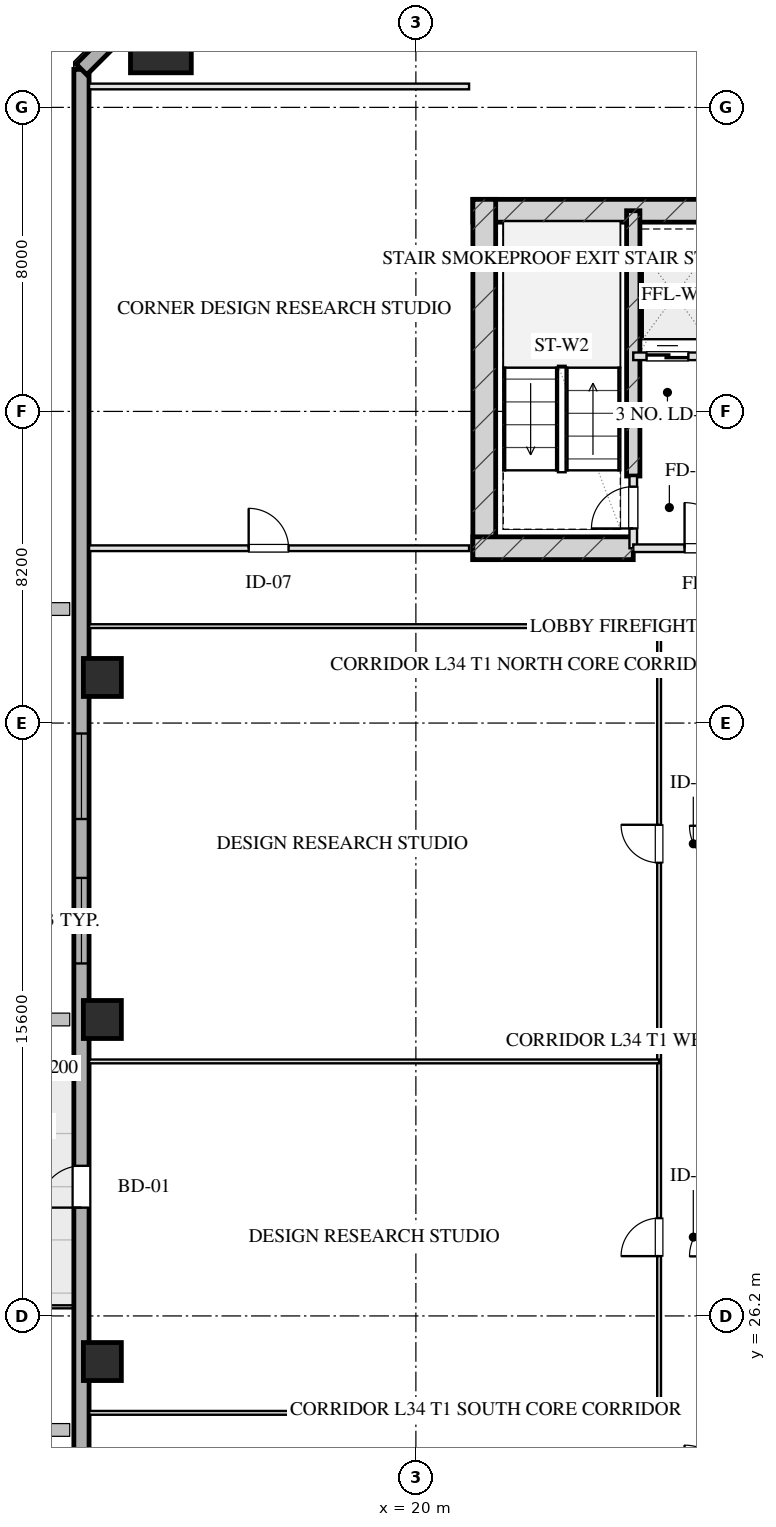
"""IFC4 building model, lengths in metres.
Left out: names, types, materials, properties, quantities, classifications, styles, units other than length and angle.
Written with IfcOpenShell. Run it as: python <this file> out.ifc"""

import sys

from ifc_helpers import new_model, si_unit, direction, frame, frame_2d, origin, origin_2d, place, context, subcontext, project, spatial, rectangle, hollow_rectangle, extrude, element, fill, save


model = new_model("IFC4")
c1 = context("Model", 3, precision=1e-05, world=origin(), true_north=direction((0.0, 1.0)))
c2 = subcontext(c1, "Body", "Model", "MODEL_VIEW")
j1 = project(units=[si_unit("LENGTHUNIT", "METRE"), si_unit("PLANEANGLEUNIT", "RADIAN")], contexts=[c1])
p1 = place(None, origin())
s1 = spatial("IfcSite", under=j1, at=p1, CompositionType="ELEMENT")
p2 = place(p1, origin())
s2 = spatial("IfcBuilding", under=s1, at=p2, CompositionType="ELEMENT")
p3 = place(p2, frame((0.0, 0.0, 131.1)))
s3 = spatial("IfcBuildingStorey", under=s2, at=p3, CompositionType="ELEMENT", Elevation=131.1)
p4 = place(p3, frame((21.5, 55.28, 0.0), z_axis=(0.0, 0.0, 1.0), x_axis=(1.0, 0.0, 0.0)))
e1 = element("IfcWall", 1, at=p4, inside=s3, PredefinedType="SHEAR", context=c2, shape_type="SweptSolid", body=[
    extrude(rectangle(XDim=17.0, YDim=0.6, at=frame_2d((8.5, 0.0))), origin(), (0.0, 0.0, 1.0), 3.45),
])
p5 = place(p3, frame((21.8, 46.1, 0.0), z_axis=(0.0, 0.0, 1.0), x_axis=(0.0, 1.0, 0.0)))
e2 = element("IfcWall", 2, at=p5, inside=s3, PredefinedType="SHEAR", context=c2, shape_type="SweptSolid", body=[
    extrude(rectangle(XDim=9.48, YDim=0.6, at=frame_2d((4.74, 0.0))), origin(), (0.0, 0.0, 1.0), 3.45),
])
p6 = place(p3, frame((25.72, 48.3, 0.0), z_axis=(0.0, 0.0, 1.0), x_axis=(0.0, 1.0, 0.0)))
e3 = element("IfcWall", 3, at=p6, inside=s3, PredefinedType="SHEAR", context=c2, shape_type="SweptSolid", body=[
    extrude(rectangle(XDim=6.98, YDim=0.35, at=frame_2d((3.49, 0.0))), origin(), (0.0, 0.0, 1.0), 3.45),
])
p7 = place(p3, frame((21.5, 46.4, 0.0), z_axis=(0.0, 0.0, 1.0), x_axis=(1.0, 0.0, 0.0)))
e4 = element("IfcWall", 4, at=p7, inside=s3, PredefinedType="SHEAR", context=c2, shape_type="SweptSolid", body=[
    extrude(rectangle(XDim=4.22, YDim=0.6, at=frame_2d((2.11, 0.0))), origin(), (0.0, 0.0, 1.0), 3.45),
])
p8 = place(p3, frame((13.29, 59.71, 0.0), z_axis=(0.0, 0.0, 1.0), x_axis=(1.0, 0.0, 0.0)))
e5 = element("IfcColumn", 5, at=p8, inside=s3, PredefinedType="COLUMN", context=c2, shape_type="SweptSolid", body=[
    extrude(hollow_rectangle(XDim=1.6, YDim=1.6, WallThickness=0.055, at=origin_2d()), origin(), (0.0, 0.0, 1.0), 3.451),
])
for number, where, z_axis, x_axis in (
    (6, (11.75, 25.0, 0.0), (0.0, 0.0, 1.0), (1.0, 0.0, 0.0)),
    (7, (11.75, 34.0, 0.0), (0.0, 0.0, 1.0), (1.0, 0.0, 0.0)),
    (8, (11.75, 43.0, 0.0), (0.0, 0.0, 1.0), (1.0, 0.0, 0.0)),
):
    element("IfcColumn", number, at=place(p3, frame(where, z_axis=z_axis, x_axis=x_axis)), inside=s3, PredefinedType="COLUMN", context=c2, shape_type="SweptSolid", body=[
        extrude(hollow_rectangle(XDim=1.0, YDim=1.0, WallThickness=0.036, at=origin_2d()), origin(), (0.0, 0.0, 1.0), 3.451),
    ])
p9 = place(p3, frame((11.2, 9.0, 0.0), z_axis=(0.0, 0.0, 1.0), x_axis=(0.0, 1.0, 0.0)))
e9 = element("IfcWall", 9, at=p9, inside=s3, PredefinedType="SOLIDWALL", context=c2, shape_type="SweptSolid", body=[
    extrude(rectangle(XDim=50.0, YDim=0.4, at=frame_2d((25.0, 0.0))), origin(), (0.0, 0.0, 1.0), 2.61),
])
p10 = place(p9, frame((26.475, 0.0, 0.75)))
e10 = element("IfcOpeningElement", 10, at=p10, cuts=e9, PredefinedType="OPENING", context=c2, shape_type="SweptSolid", body=[
    extrude(rectangle(XDim=2.25, YDim=1.46, at=frame_2d((1.125, 0.73))), frame((0.0, 0.21, 0.0), z_axis=(0.0, -1.0, 0.0), x_axis=(1.0, 0.0, 0.0)), (0.0, 0.0, 1.0), 0.42),
])
p11 = place(p9, frame((30.275, 0.0, 0.75)))
e11 = element("IfcOpeningElement", 11, at=p11, cuts=e9, PredefinedType="OPENING", context=c2, shape_type="SweptSolid", body=[
    extrude(rectangle(XDim=2.25, YDim=1.46, at=frame_2d((1.125, 0.73))), frame((0.0, 0.21, 0.0), z_axis=(0.0, -1.0, 0.0), x_axis=(1.0, 0.0, 0.0)), (0.0, 0.0, 1.0), 0.42),
])
p12 = place(p9, frame((20.05, 0.0, 0.0)))
e12 = element("IfcOpeningElement", 12, at=p12, cuts=e9, PredefinedType="OPENING", context=c2, shape_type="SweptSolid", body=[
    extrude(rectangle(XDim=1.1, YDim=2.15, at=frame_2d((0.55, 1.075))), frame((0.0, 0.21, 0.0), z_axis=(0.0, -1.0, 0.0), x_axis=(1.0, 0.0, 0.0)), (0.0, 0.0, 1.0), 0.42),
])
p13 = place(p3, frame((11.2, 59.0, 0.0), z_axis=(0.0, 0.0, 1.0), x_axis=(0.707106781187, 0.707106781187, 0.0)))
e13 = element("IfcWall", 13, at=p13, inside=s3, PredefinedType="SOLIDWALL", context=c2, shape_type="SweptSolid", body=[
    extrude(rectangle(XDim=3.96, YDim=0.4, at=frame_2d((1.98, 0.0))), origin(), (0.0, 0.0, 1.0), 2.61),
])
p14 = place(p3, frame((25.72, 46.4, 0.0), z_axis=(0.0, 0.0, 1.0), x_axis=(0.0, 1.0, 0.0)))
e14 = element("IfcWall", 14, at=p14, inside=s3, PredefinedType="PARTITIONING", context=c2, shape_type="SweptSolid", body=[
    extrude(rectangle(XDim=1.9, YDim=0.2, at=frame_2d((0.95, 0.0))), origin(), (0.0, 0.0, 1.0), 3.175),
])
p15 = place(p14, frame((0.52, 0.0, 0.0)))
e15 = element("IfcOpeningElement", 15, at=p15, cuts=e14, PredefinedType="OPENING", context=c2, shape_type="SweptSolid", body=[
    extrude(rectangle(XDim=1.1, YDim=2.05, at=frame_2d((0.55, 1.025))), frame((0.0, 0.11, 0.0), z_axis=(0.0, -1.0, 0.0), x_axis=(1.0, 0.0, 0.0)), (0.0, 0.0, 1.0), 0.22),
])
p16 = place(p3, frame((25.72, 46.4, 0.0), z_axis=(0.0, 0.0, 1.0), x_axis=(1.0, 0.0, 0.0)))
e16 = element("IfcWall", 16, at=p16, inside=s3, PredefinedType="PARTITIONING", context=c2, shape_type="SweptSolid", body=[
    extrude(rectangle(XDim=3.83, YDim=0.2, at=frame_2d((1.915, 0.0))), origin(), (0.0, 0.0, 1.0), 3.175),
])
p17 = place(p16, frame((1.35, 0.0, 0.0)))
e17 = element("IfcOpeningElement", 17, at=p17, cuts=e16, PredefinedType="OPENING", context=c2, shape_type="SweptSolid", body=[
    extrude(rectangle(XDim=1.2, YDim=2.05, at=frame_2d((0.6, 1.025))), frame((0.0, 0.11, 0.0), z_axis=(0.0, -1.0, 0.0), x_axis=(1.0, 0.0, 0.0)), (0.0, 0.0, 1.0), 0.22),
])
p18 = place(p3, frame((25.72, 51.45, 0.0), z_axis=(0.0, 0.0, 1.0), x_axis=(1.0, 0.0, 0.0)))
e18 = element("IfcWall", 18, at=p18, inside=s3, PredefinedType="PARTITIONING", context=c2, shape_type="SweptSolid", body=[
    extrude(rectangle(XDim=2.1, YDim=0.2, at=frame_2d((1.05, 0.0))), origin(), (0.0, 0.0, 1.0), 3.175),
])
p19 = place(p18, frame((0.35, 0.0, 0.0)))
e19 = element("IfcOpeningElement", 19, at=p19, cuts=e18, PredefinedType="OPENING", context=c2, shape_type="SweptSolid", body=[
    extrude(rectangle(XDim=1.1, YDim=2.05, at=frame_2d((0.55, 1.025))), frame((0.0, 0.11, 0.0), z_axis=(0.0, -1.0, 0.0), x_axis=(1.0, 0.0, 0.0)), (0.0, 0.0, 1.0), 0.22),
])
p20 = place(p3, frame((11.4, 58.55, 0.0), z_axis=(0.0, 0.0, 1.0), x_axis=(1.0, 0.0, 0.0)))
e20 = element("IfcWall", 20, at=p20, inside=s3, PredefinedType="PARTITIONING", context=c2, shape_type="SweptSolid", body=[
    extrude(rectangle(XDim=10.0, YDim=0.15, at=frame_2d((5.0, 0.0))), origin(), (0.0, 0.0, 1.0), 3.175),
])
p21 = place(p3, frame((11.4, 46.4, 0.0), z_axis=(0.0, 0.0, 1.0), x_axis=(1.0, 0.0, 0.0)))
e21 = element("IfcWall", 21, at=p21, inside=s3, PredefinedType="PARTITIONING", context=c2, shape_type="SweptSolid", body=[
    extrude(rectangle(XDim=10.0, YDim=0.15, at=frame_2d((5.0, 0.0))), origin(), (0.0, 0.0, 1.0), 3.175),
])
p22 = place(p21, frame((4.2, 0.0, 0.0)))
e22 = element("IfcOpeningElement", 22, at=p22, cuts=e21, PredefinedType="OPENING", context=c2, shape_type="SweptSolid", body=[
    extrude(rectangle(XDim=1.05, YDim=2.05, at=frame_2d((0.525, 1.025))), frame((0.0, 0.085, 0.0), z_axis=(0.0, -1.0, 0.0), x_axis=(1.0, 0.0, 0.0)), (0.0, 0.0, 1.0), 0.17),
])
for number, where, z_axis, x_axis in (
    (23, (11.4, 23.65, 0.0), (0.0, 0.0, 1.0), (1.0, 0.0, 0.0)),
    (24, (11.4, 44.35, 0.0), (0.0, 0.0, 1.0), (1.0, 0.0, 0.0)),
):
    element("IfcWall", number, at=place(p3, frame(where, z_axis=z_axis, x_axis=x_axis)), inside=s3, PredefinedType="MOVABLE", context=c2, shape_type="SweptSolid", body=[
        extrude(rectangle(XDim=15.0, YDim=0.1, at=frame_2d((7.5, 0.0))), origin(), (0.0, 0.0, 1.0), 3.175),
    ])
p23 = place(p3, frame((26.4, 23.65, 0.0), z_axis=(0.0, 0.0, 1.0), x_axis=(0.0, 1.0, 0.0)))
e25 = element("IfcWall", 25, at=p23, inside=s3, PredefinedType="MOVABLE", context=c2, shape_type="SweptSolid", body=[
    extrude(rectangle(XDim=20.7, YDim=0.1, at=frame_2d((10.35, 0.0))), origin(), (0.0, 0.0, 1.0), 3.175),
])
p24 = place(p23, frame((4.124, 0.0, 0.0)))
e26 = element("IfcOpeningElement", 26, at=p24, cuts=e25, PredefinedType="OPENING", context=c2, shape_type="SweptSolid", body=[
    extrude(rectangle(XDim=1.0, YDim=2.05, at=frame_2d((0.5, 1.025))), frame((0.0, 0.06, 0.0), z_axis=(0.0, -1.0, 0.0), x_axis=(1.0, 0.0, 0.0)), (0.0, 0.0, 1.0), 0.12),
])
p25 = place(p23, frame((14.473, 0.0, 0.0)))
e27 = element("IfcOpeningElement", 27, at=p25, cuts=e25, PredefinedType="OPENING", context=c2, shape_type="SweptSolid", body=[
    extrude(rectangle(XDim=1.0, YDim=2.05, at=frame_2d((0.5, 1.025))), frame((0.0, 0.06, 0.0), z_axis=(0.0, -1.0, 0.0), x_axis=(1.0, 0.0, 0.0)), (0.0, 0.0, 1.0), 0.12),
])
p26 = place(p3, frame((11.4, 32.897, 0.0), z_axis=(0.0, 0.0, 1.0), x_axis=(1.0, 0.0, 0.0)))
e28 = element("IfcWall", 28, at=p26, inside=s3, PredefinedType="MOVABLE", context=c2, shape_type="SweptSolid", body=[
    extrude(rectangle(XDim=15.0, YDim=0.1, at=frame_2d((7.5, 0.0))), origin(), (0.0, 0.0, 1.0), 3.175),
])
p27 = place(p10, origin())
e29 = element("IfcWindow", 29, at=p27, inside=s3, PartitioningType="TRIPLE_PANEL_VERTICAL", PredefinedType="WINDOW", context=c2, shape_type="SweptSolid", body=[
    extrude(rectangle(XDim=2.25, YDim=1.46, at=frame_2d((1.125, 0.73))), frame((0.0, 0.03, 0.0), z_axis=(0.0, -1.0, 0.0), x_axis=(1.0, 0.0, 0.0)), (0.0, 0.0, 1.0), 0.06),
])
fill(e10, e29)
p28 = place(p11, origin())
e30 = element("IfcWindow", 30, at=p28, inside=s3, PartitioningType="TRIPLE_PANEL_VERTICAL", PredefinedType="WINDOW", context=c2, shape_type="SweptSolid", body=[
    extrude(rectangle(XDim=2.25, YDim=1.46, at=frame_2d((1.125, 0.73))), frame((0.0, 0.03, 0.0), z_axis=(0.0, -1.0, 0.0), x_axis=(1.0, 0.0, 0.0)), (0.0, 0.0, 1.0), 0.06),
])
fill(e11, e30)
p29 = place(p12, origin())
e31 = element("IfcDoor", 31, at=p29, inside=s3, OperationType="SINGLE_SWING_LEFT", PredefinedType="DOOR", context=c2, shape_type="SweptSolid", body=[
    extrude(rectangle(XDim=1.1, YDim=2.15, at=frame_2d((0.55, 1.075))), frame((0.0, 0.025, 0.0), z_axis=(0.0, -1.0, 0.0), x_axis=(1.0, 0.0, 0.0)), (0.0, 0.0, 1.0), 0.05),
])
fill(e12, e31)
p30 = place(p15, origin())
e32 = element("IfcDoor", 32, at=p30, inside=s3, OperationType="SINGLE_SWING_LEFT", PredefinedType="DOOR", context=c2, shape_type="SweptSolid", body=[
    extrude(rectangle(XDim=1.1, YDim=2.05, at=frame_2d((0.55, 1.025))), frame((0.0, 0.025, 0.0), z_axis=(0.0, -1.0, 0.0), x_axis=(1.0, 0.0, 0.0)), (0.0, 0.0, 1.0), 0.05),
])
fill(e15, e32)
p31 = place(p17, origin())
e33 = element("IfcDoor", 33, at=p31, inside=s3, OperationType="SINGLE_SWING_LEFT", PredefinedType="DOOR", context=c2, shape_type="SweptSolid", body=[
    extrude(rectangle(XDim=1.2, YDim=2.05, at=frame_2d((0.6, 1.025))), frame((0.0, 0.025, 0.0), z_axis=(0.0, -1.0, 0.0), x_axis=(1.0, 0.0, 0.0)), (0.0, 0.0, 1.0), 0.05),
])
fill(e17, e33)
p32 = place(p19, origin())
e34 = element("IfcDoor", 34, at=p32, inside=s3, OperationType="DOUBLE_DOOR_SLIDING", PredefinedType="DOOR", context=c2, shape_type="SweptSolid", body=[
    extrude(rectangle(XDim=1.1, YDim=2.05, at=frame_2d((0.55, 1.025))), frame((0.0, 0.025, 0.0), z_axis=(0.0, -1.0, 0.0), x_axis=(1.0, 0.0, 0.0)), (0.0, 0.0, 1.0), 0.05),
])
fill(e19, e34)
p33 = place(p22, origin())
e35 = element("IfcDoor", 35, at=p33, inside=s3, OperationType="SINGLE_SWING_LEFT", PredefinedType="DOOR", context=c2, shape_type="SweptSolid", body=[
    extrude(rectangle(XDim=1.05, YDim=2.05, at=frame_2d((0.525, 1.025))), frame((0.0, 0.025, 0.0), z_axis=(0.0, -1.0, 0.0), x_axis=(1.0, 0.0, 0.0)), (0.0, 0.0, 1.0), 0.05),
])
fill(e22, e35)
p34 = place(p24, origin())
e36 = element("IfcDoor", 36, at=p34, inside=s3, OperationType="SINGLE_SWING_LEFT", PredefinedType="DOOR", context=c2, shape_type="SweptSolid", body=[
    extrude(rectangle(XDim=1.0, YDim=2.05, at=frame_2d((0.5, 1.025))), frame((0.0, 0.025, 0.0), z_axis=(0.0, -1.0, 0.0), x_axis=(1.0, 0.0, 0.0)), (0.0, 0.0, 1.0), 0.05),
])
fill(e26, e36)
p35 = place(p25, origin())
e37 = element("IfcDoor", 37, at=p35, inside=s3, OperationType="SINGLE_SWING_RIGHT", PredefinedType="DOOR", context=c2, shape_type="SweptSolid", body=[
    extrude(rectangle(XDim=1.0, YDim=2.05, at=frame_2d((0.5, 1.025))), frame((0.0, 0.025, 0.0), z_axis=(0.0, -1.0, 0.0), x_axis=(1.0, 0.0, 0.0)), (0.0, 0.0, 1.0), 0.05),
])
fill(e27, e37)
save(model, sys.argv[1])
